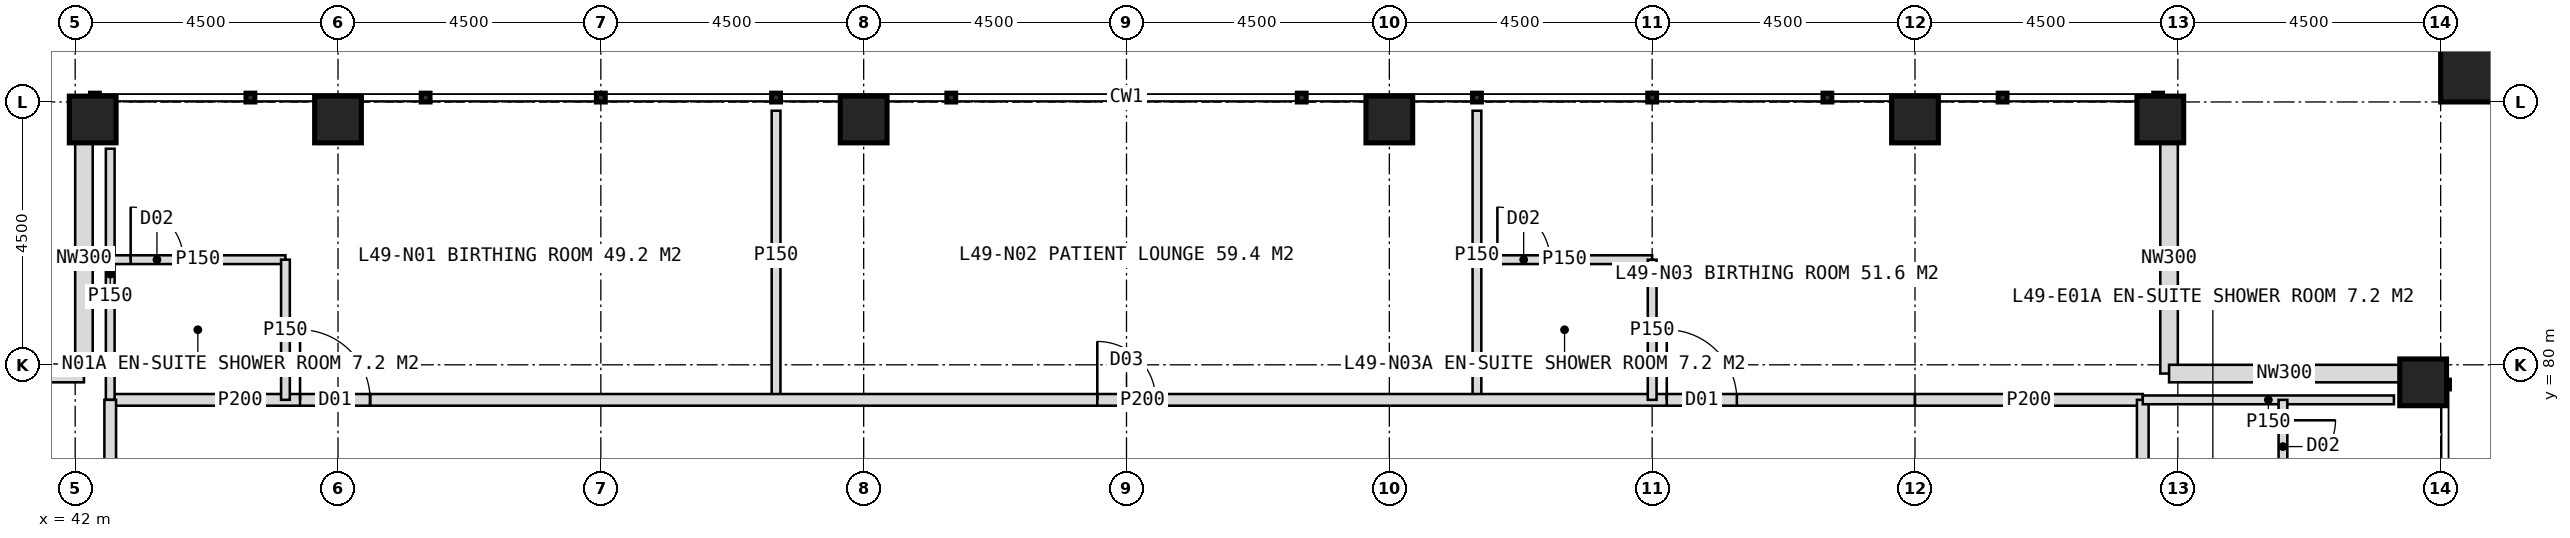
"""IFC4 building model, lengths in metres.
Left out: names, types, materials, properties, quantities, classifications, styles, units other than length and angle.
Written with IfcOpenShell. Run it as: python <this file> out.ifc"""

import sys

from ifc_helpers import new_model, si_unit, direction, frame, frame_2d, origin, origin_2d, place, context, subcontext, project, spatial, rectangle, hollow_rectangle, extrude, element, fill, save


model = new_model("IFC4")
c1 = context("Model", 3, precision=1e-05, world=origin(), true_north=direction((0.0, 1.0)))
c2 = subcontext(c1, "Body", "Model", "MODEL_VIEW")
j1 = project(units=[si_unit("LENGTHUNIT", "METRE"), si_unit("PLANEANGLEUNIT", "RADIAN")], contexts=[c1])
p1 = place(None, origin())
s1 = spatial("IfcSite", under=j1, at=p1, CompositionType="ELEMENT")
p2 = place(p1, origin())
s2 = spatial("IfcBuilding", under=s1, at=p2, CompositionType="ELEMENT")
p3 = place(p2, frame((0.0, 0.0, 205.0)))
s3 = spatial("IfcBuildingStorey", under=s2, at=p3, CompositionType="ELEMENT", Elevation=205.0)
for number, where, z_axis, x_axis in (
    (1, (42.3, 84.2, 0.0), (0.0, 0.0, 1.0), (1.0, 0.0, 0.0)),
    (2, (46.5, 84.2, 0.0), (0.0, 0.0, 1.0), (1.0, 0.0, 0.0)),
    (3, (55.5, 84.2, 0.0), (0.0, 0.0, 1.0), (1.0, 0.0, 0.0)),
    (4, (64.5, 84.2, 0.0), (0.0, 0.0, 1.0), (1.0, 0.0, 0.0)),
    (5, (73.5, 84.2, 0.0), (0.0, 0.0, 1.0), (1.0, 0.0, 0.0)),
    (6, (77.7, 84.2, 0.0), (0.0, 0.0, 1.0), (1.0, 0.0, 0.0)),
    (7, (82.2, 79.7, 0.0), (0.0, 0.0, 1.0), (1.0, 0.0, 0.0)),
):
    element("IfcColumn", number, at=place(p3, frame(where, z_axis=z_axis, x_axis=x_axis)), inside=s3, PredefinedType="COLUMN", context=c2, shape_type="SweptSolid", body=[
        extrude(hollow_rectangle(XDim=0.8, YDim=0.8, WallThickness=0.08, at=origin_2d()), origin(), (0.0, 0.0, 1.0), 4.0),
    ])
p4 = place(p3, frame((83.1, 85.1, 0.0), z_axis=(0.0, 0.0, 1.0), x_axis=(1.0, 0.0, 0.0)))
e8 = element("IfcColumn", 8, at=p4, inside=s3, PredefinedType="COLUMN", context=c2, shape_type="SweptSolid", body=[
    extrude(hollow_rectangle(XDim=1.2, YDim=1.2, WallThickness=0.07, at=origin_2d()), origin(), (0.0, 0.0, 1.0), 4.0),
])
for number, where, z_axis, x_axis in (
    (9, (77.85, 83.8, 0.0), (0.0, 0.0, 1.0), (0.0, -1.0, 0.0)),
    (10, (77.85, 79.85, 0.0), (0.0, 0.0, 1.0), (1.0, 0.0, 0.0)),
    (11, (38.2, 79.85, 0.0), (0.0, 0.0, 1.0), (1.0, 0.0, 0.0)),
    (12, (42.15, 79.85, 0.0), (0.0, 0.0, 1.0), (0.0, 1.0, 0.0)),
):
    element("IfcWall", number, at=place(p3, frame(where, z_axis=z_axis, x_axis=x_axis)), inside=s3, PredefinedType="ELEMENTEDWALL", context=c2, shape_type="SweptSolid", body=[
        extrude(rectangle(XDim=3.95, YDim=0.3, at=frame_2d((1.975, 0.0))), origin(), (0.0, 0.0, 1.0), 2.85),
    ])
for number, where, z_axis, x_axis in (
    (13, (54.0, 79.4, 0.0), (0.0, 0.0, 1.0), (0.0, 1.0, 0.0)),
    (14, (66.0, 79.4, 0.0), (0.0, 0.0, 1.0), (0.0, 1.0, 0.0)),
):
    element("IfcWall", number, at=place(p3, frame(where, z_axis=z_axis, x_axis=x_axis)), inside=s3, PredefinedType="PARTITIONING", context=c2, shape_type="SweptSolid", body=[
        extrude(rectangle(XDim=4.95, YDim=0.15, at=frame_2d((2.475, 0.0))), origin(), (0.0, 0.0, 1.0), 3.75),
    ])
p5 = place(p3, frame((42.6, 79.4, 0.0), z_axis=(0.0, 0.0, 1.0), x_axis=(1.0, 0.0, 0.0)))
e15 = element("IfcWall", 15, at=p5, inside=s3, PredefinedType="PARTITIONING", context=c2, shape_type="SweptSolid", body=[
    extrude(rectangle(XDim=4.45, YDim=0.2, at=frame_2d((2.225, 0.0))), origin(), (0.0, 0.0, 1.0), 2.85),
])
p6 = place(p5, frame((3.25, 0.0, 0.0)))
e16 = element("IfcOpeningElement", 16, at=p6, cuts=e15, PredefinedType="OPENING", context=c2, shape_type="SweptSolid", body=[
    extrude(rectangle(XDim=1.2, YDim=2.2, at=frame_2d((0.6, 1.1))), frame((0.0, 0.11, 0.0), z_axis=(0.0, -1.0, 0.0), x_axis=(1.0, 0.0, 0.0)), (0.0, 0.0, 1.0), 0.22),
])
p7 = place(p3, frame((47.05, 79.4, 0.0), z_axis=(0.0, 0.0, 1.0), x_axis=(1.0, 0.0, 0.0)))
e17 = element("IfcWall", 17, at=p7, inside=s3, PredefinedType="PARTITIONING", context=c2, shape_type="SweptSolid", body=[
    extrude(rectangle(XDim=26.45, YDim=0.2, at=frame_2d((13.225, 0.0))), origin(), (0.0, 0.0, 1.0), 3.75),
])
p8 = place(p7, frame((12.45, 0.0, 0.0)))
e18 = element("IfcOpeningElement", 18, at=p8, cuts=e17, PredefinedType="OPENING", context=c2, shape_type="SweptSolid", body=[
    extrude(rectangle(XDim=1.0, YDim=2.1, at=frame_2d((0.5, 1.05))), frame((0.0, 0.11, 0.0), z_axis=(0.0, -1.0, 0.0), x_axis=(1.0, 0.0, 0.0)), (0.0, 0.0, 1.0), 0.22),
])
p9 = place(p7, frame((22.2, 0.0, 0.0)))
e19 = element("IfcOpeningElement", 19, at=p9, cuts=e17, PredefinedType="OPENING", context=c2, shape_type="SweptSolid", body=[
    extrude(rectangle(XDim=1.2, YDim=2.2, at=frame_2d((0.6, 1.1))), frame((0.0, 0.11, 0.0), z_axis=(0.0, -1.0, 0.0), x_axis=(1.0, 0.0, 0.0)), (0.0, 0.0, 1.0), 0.22),
])
p10 = place(p3, frame((73.5, 79.4, 0.0), z_axis=(0.0, 0.0, 1.0), x_axis=(1.0, 0.0, 0.0)))
e20 = element("IfcWall", 20, at=p10, inside=s3, PredefinedType="PARTITIONING", context=c2, shape_type="SweptSolid", body=[
    extrude(rectangle(XDim=3.9, YDim=0.2, at=frame_2d((1.95, 0.0))), origin(), (0.0, 0.0, 1.0), 2.85),
])
p11 = place(p3, frame((42.6, 79.4, 0.0), z_axis=(0.0, 0.0, 1.0), x_axis=(0.0, 1.0, 0.0)))
e21 = element("IfcWall", 21, at=p11, inside=s3, PredefinedType="PARTITIONING", context=c2, shape_type="SweptSolid", body=[
    extrude(rectangle(XDim=4.3, YDim=0.15, at=frame_2d((2.15, 0.0))), origin(), (0.0, 0.0, 1.0), 2.85),
])
p12 = place(p3, frame((42.6, 81.8, 0.0), z_axis=(0.0, 0.0, 1.0), x_axis=(1.0, 0.0, 0.0)))
e22 = element("IfcWall", 22, at=p12, inside=s3, PredefinedType="PARTITIONING", context=c2, shape_type="SweptSolid", body=[
    extrude(rectangle(XDim=3.0, YDim=0.15, at=frame_2d((1.5, 0.0))), origin(), (0.0, 0.0, 1.0), 3.75),
])
p13 = place(p12, frame((0.35, 0.0, 0.0)))
e23 = element("IfcOpeningElement", 23, at=p13, cuts=e22, PredefinedType="OPENING", context=c2, shape_type="SweptSolid", body=[
    extrude(rectangle(XDim=0.9, YDim=2.1, at=frame_2d((0.45, 1.05))), frame((0.0, 0.085, 0.0), z_axis=(0.0, -1.0, 0.0), x_axis=(1.0, 0.0, 0.0)), (0.0, 0.0, 1.0), 0.17),
])
p14 = place(p3, frame((45.6, 79.4, 0.0), z_axis=(0.0, 0.0, 1.0), x_axis=(0.0, 1.0, 0.0)))
e24 = element("IfcWall", 24, at=p14, inside=s3, PredefinedType="PARTITIONING", context=c2, shape_type="SweptSolid", body=[
    extrude(rectangle(XDim=2.4, YDim=0.15, at=frame_2d((1.2, 0.0))), origin(), (0.0, 0.0, 1.0), 3.75),
])
p15 = place(p3, frame((66.0, 81.8, 0.0), z_axis=(0.0, 0.0, 1.0), x_axis=(1.0, 0.0, 0.0)))
e25 = element("IfcWall", 25, at=p15, inside=s3, PredefinedType="PARTITIONING", context=c2, shape_type="SweptSolid", body=[
    extrude(rectangle(XDim=3.0, YDim=0.15, at=frame_2d((1.5, 0.0))), origin(), (0.0, 0.0, 1.0), 3.75),
])
p16 = place(p15, frame((0.35, 0.0, 0.0)))
e26 = element("IfcOpeningElement", 26, at=p16, cuts=e25, PredefinedType="OPENING", context=c2, shape_type="SweptSolid", body=[
    extrude(rectangle(XDim=0.9, YDim=2.1, at=frame_2d((0.45, 1.05))), frame((0.0, 0.085, 0.0), z_axis=(0.0, -1.0, 0.0), x_axis=(1.0, 0.0, 0.0)), (0.0, 0.0, 1.0), 0.17),
])
p17 = place(p3, frame((69.0, 79.4, 0.0), z_axis=(0.0, 0.0, 1.0), x_axis=(0.0, 1.0, 0.0)))
e27 = element("IfcWall", 27, at=p17, inside=s3, PredefinedType="PARTITIONING", context=c2, shape_type="SweptSolid", body=[
    extrude(rectangle(XDim=2.4, YDim=0.15, at=frame_2d((1.2, 0.0))), origin(), (0.0, 0.0, 1.0), 3.75),
])
p18 = place(p3, frame((42.6, 75.5, 0.0), z_axis=(0.0, 0.0, 1.0), x_axis=(0.0, 1.0, 0.0)))
e28 = element("IfcWall", 28, at=p18, inside=s3, PredefinedType="PARTITIONING", context=c2, shape_type="SweptSolid", body=[
    extrude(rectangle(XDim=3.9, YDim=0.2, at=frame_2d((1.95, 0.0))), origin(), (0.0, 0.0, 1.0), 2.85),
])
p19 = place(p3, frame((77.4, 79.4, 0.0), z_axis=(0.0, 0.0, 1.0), x_axis=(0.0, -1.0, 0.0)))
e29 = element("IfcWall", 29, at=p19, inside=s3, PredefinedType="PARTITIONING", context=c2, shape_type="SweptSolid", body=[
    extrude(rectangle(XDim=4.45, YDim=0.2, at=frame_2d((2.225, 0.0))), origin(), (0.0, 0.0, 1.0), 2.85),
])
p20 = place(p19, frame((3.25, 0.0, 0.0)))
e30 = element("IfcOpeningElement", 30, at=p20, cuts=e29, PredefinedType="OPENING", context=c2, shape_type="SweptSolid", body=[
    extrude(rectangle(XDim=1.2, YDim=2.2, at=frame_2d((0.6, 1.1))), frame((0.0, 0.11, 0.0), z_axis=(0.0, -1.0, 0.0), x_axis=(1.0, 0.0, 0.0)), (0.0, 0.0, 1.0), 0.22),
])
p21 = place(p3, frame((77.4, 79.4, 0.0), z_axis=(0.0, 0.0, 1.0), x_axis=(1.0, 0.0, 0.0)))
e31 = element("IfcWall", 31, at=p21, inside=s3, PredefinedType="PARTITIONING", context=c2, shape_type="SweptSolid", body=[
    extrude(rectangle(XDim=4.3, YDim=0.15, at=frame_2d((2.15, 0.0))), origin(), (0.0, 0.0, 1.0), 2.85),
])
p22 = place(p3, frame((79.8, 79.4, 0.0), z_axis=(0.0, 0.0, 1.0), x_axis=(0.0, -1.0, 0.0)))
e32 = element("IfcWall", 32, at=p22, inside=s3, PredefinedType="PARTITIONING", context=c2, shape_type="SweptSolid", body=[
    extrude(rectangle(XDim=3.0, YDim=0.15, at=frame_2d((1.5, 0.0))), origin(), (0.0, 0.0, 1.0), 3.75),
])
p23 = place(p22, frame((0.35, 0.0, 0.0)))
e33 = element("IfcOpeningElement", 33, at=p23, cuts=e32, PredefinedType="OPENING", context=c2, shape_type="SweptSolid", body=[
    extrude(rectangle(XDim=0.9, YDim=2.1, at=frame_2d((0.45, 1.05))), frame((0.0, 0.085, 0.0), z_axis=(0.0, -1.0, 0.0), x_axis=(1.0, 0.0, 0.0)), (0.0, 0.0, 1.0), 0.17),
])
p24 = place(p6, origin())
e34 = element("IfcDoor", 34, at=p24, inside=s3, OperationType="SINGLE_SWING_LEFT", PredefinedType="DOOR", context=c2, shape_type="SweptSolid", body=[
    extrude(rectangle(XDim=1.2, YDim=2.2, at=frame_2d((0.6, 1.1))), frame((0.0, 0.025, 0.0), z_axis=(0.0, -1.0, 0.0), x_axis=(1.0, 0.0, 0.0)), (0.0, 0.0, 1.0), 0.05),
])
fill(e16, e34)
p25 = place(p13, origin())
e35 = element("IfcDoor", 35, at=p25, inside=s3, OperationType="SINGLE_SWING_LEFT", PredefinedType="DOOR", context=c2, shape_type="SweptSolid", body=[
    extrude(rectangle(XDim=0.9, YDim=2.1, at=frame_2d((0.45, 1.05))), frame((0.0, 0.025, 0.0), z_axis=(0.0, -1.0, 0.0), x_axis=(1.0, 0.0, 0.0)), (0.0, 0.0, 1.0), 0.05),
])
fill(e23, e35)
p26 = place(p8, origin())
e36 = element("IfcDoor", 36, at=p26, inside=s3, OperationType="SINGLE_SWING_LEFT", PredefinedType="DOOR", context=c2, shape_type="SweptSolid", body=[
    extrude(rectangle(XDim=1.0, YDim=2.1, at=frame_2d((0.5, 1.05))), frame((0.0, 0.025, 0.0), z_axis=(0.0, -1.0, 0.0), x_axis=(1.0, 0.0, 0.0)), (0.0, 0.0, 1.0), 0.05),
])
fill(e18, e36)
p27 = place(p9, origin())
e37 = element("IfcDoor", 37, at=p27, inside=s3, OperationType="SINGLE_SWING_LEFT", PredefinedType="DOOR", context=c2, shape_type="SweptSolid", body=[
    extrude(rectangle(XDim=1.2, YDim=2.2, at=frame_2d((0.6, 1.1))), frame((0.0, 0.025, 0.0), z_axis=(0.0, -1.0, 0.0), x_axis=(1.0, 0.0, 0.0)), (0.0, 0.0, 1.0), 0.05),
])
fill(e19, e37)
p28 = place(p16, origin())
e38 = element("IfcDoor", 38, at=p28, inside=s3, OperationType="SINGLE_SWING_LEFT", PredefinedType="DOOR", context=c2, shape_type="SweptSolid", body=[
    extrude(rectangle(XDim=0.9, YDim=2.1, at=frame_2d((0.45, 1.05))), frame((0.0, 0.025, 0.0), z_axis=(0.0, -1.0, 0.0), x_axis=(1.0, 0.0, 0.0)), (0.0, 0.0, 1.0), 0.05),
])
fill(e26, e38)
p29 = place(p23, origin())
e39 = element("IfcDoor", 39, at=p29, inside=s3, OperationType="SINGLE_SWING_LEFT", PredefinedType="DOOR", context=c2, shape_type="SweptSolid", body=[
    extrude(rectangle(XDim=0.9, YDim=2.1, at=frame_2d((0.45, 1.05))), frame((0.0, 0.025, 0.0), z_axis=(0.0, -1.0, 0.0), x_axis=(1.0, 0.0, 0.0)), (0.0, 0.0, 1.0), 0.05),
])
fill(e33, e39)
save(model, sys.argv[1])
